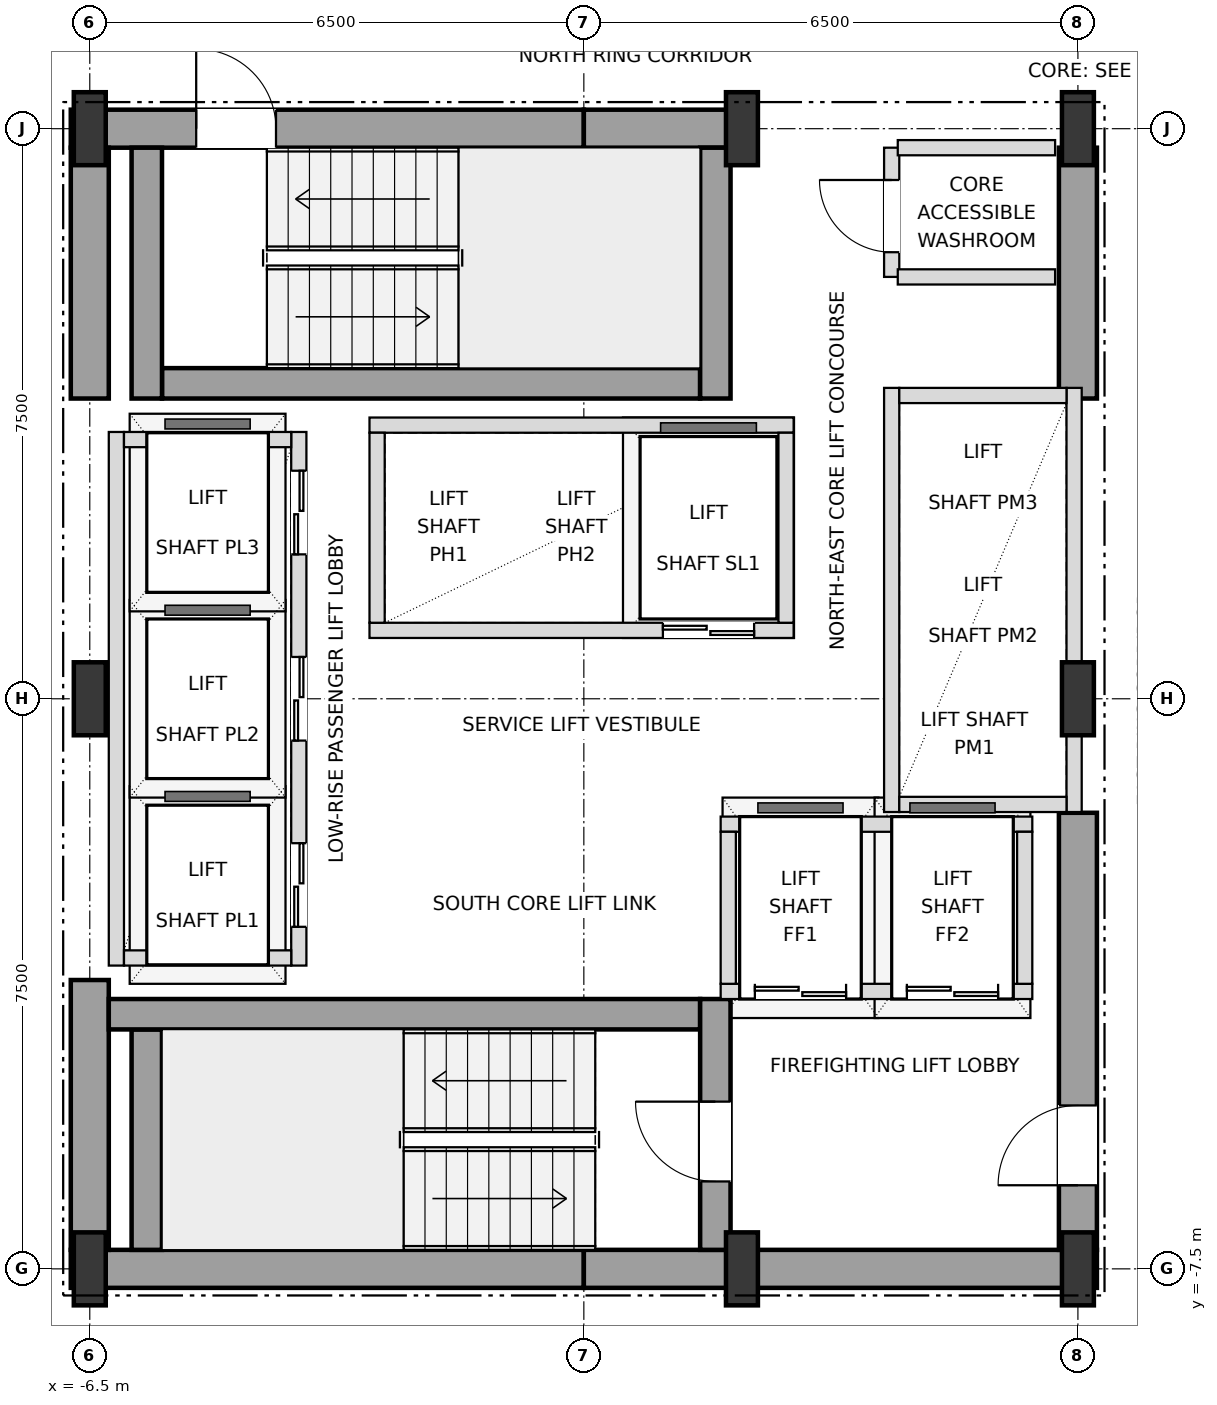
"""IFC4 building model, lengths in metres.
Left out: names, types, materials, properties, quantities, classifications, styles, units other than length and angle.
Written with IfcOpenShell. Run it as: python <this file> out.ifc"""

import sys

from ifc_helpers import new_model, si_unit, direction, frame, frame_2d, origin, origin_2d, place, context, subcontext, project, spatial, rectangle, i_section, extrude, element, fill, save


model = new_model("IFC4")
c1 = context("Model", 3, precision=1e-05, world=origin(), true_north=direction((0.0, 1.0)))
c2 = subcontext(c1, "Body", "Model", "MODEL_VIEW")
j1 = project(units=[si_unit("LENGTHUNIT", "METRE"), si_unit("PLANEANGLEUNIT", "RADIAN")], contexts=[c1])
p1 = place(None, origin())
s1 = spatial("IfcSite", under=j1, at=p1, CompositionType="ELEMENT")
p2 = place(p1, origin())
s2 = spatial("IfcBuilding", under=s1, at=p2, CompositionType="ELEMENT")
p3 = place(p2, frame((0.0, 0.0, 102.6)))
s3 = spatial("IfcBuildingStorey", under=s2, at=p3, CompositionType="ELEMENT", Elevation=102.6)
for number, where, z_axis, x_axis in (
    (1, (-6.5, -7.5, 0.0), (0.0, 0.0, 1.0), (1.0, 0.0, 0.0)),
    (2, (2.08, -7.5, 0.0), (0.0, 0.0, 1.0), (1.0, 0.0, 0.0)),
    (3, (6.5, -7.5, 0.0), (0.0, 0.0, 1.0), (1.0, 0.0, 0.0)),
    (4, (-6.5, 0.0, 0.0), (0.0, 0.0, 1.0), (1.0, 0.0, 0.0)),
    (5, (6.5, 0.0, 0.0), (0.0, 0.0, 1.0), (1.0, 0.0, 0.0)),
    (6, (-6.5, 7.5, 0.0), (0.0, 0.0, 1.0), (1.0, 0.0, 0.0)),
    (7, (2.08, 7.5, 0.0), (0.0, 0.0, 1.0), (1.0, 0.0, 0.0)),
    (8, (6.5, 7.5, 0.0), (0.0, 0.0, 1.0), (1.0, 0.0, 0.0)),
):
    element("IfcColumn", number, at=place(p3, frame(where, z_axis=z_axis, x_axis=x_axis)), inside=s3, PredefinedType="COLUMN", context=c2, shape_type="SweptSolid", body=[
        extrude(i_section(OverallWidth=0.42, OverallDepth=0.96, WebThickness=0.022, FlangeThickness=0.034, at=origin_2d()), origin(), (0.0, 0.0, 1.0), 3.6),
    ])
for number, where, z_axis, x_axis in (
    (9, (-6.75, -7.5, 0.0), (0.0, 0.0, 1.0), (1.0, 0.0, 0.0)),
    (10, (0.0, -7.5, 0.0), (0.0, 0.0, 1.0), (1.0, 0.0, 0.0)),
):
    element("IfcWall", number, at=place(p3, frame(where, z_axis=z_axis, x_axis=x_axis)), inside=s3, PredefinedType="SHEAR", context=c2, shape_type="SweptSolid", body=[
        extrude(rectangle(XDim=6.75, YDim=0.5, at=frame_2d((3.375, 0.0))), origin(), (0.0, 0.0, 1.0), 3.38),
    ])
p4 = place(p3, frame((-6.75, 7.5, 0.0), z_axis=(0.0, 0.0, 1.0), x_axis=(1.0, 0.0, 0.0)))
e11 = element("IfcWall", 11, at=p4, inside=s3, PredefinedType="SHEAR", context=c2, shape_type="SweptSolid", body=[
    extrude(rectangle(XDim=6.75, YDim=0.5, at=frame_2d((3.375, 0.0))), origin(), (0.0, 0.0, 1.0), 3.38),
])
p5 = place(p4, frame((1.65, 0.0, 0.0)))
e12 = element("IfcOpeningElement", 12, at=p5, cuts=e11, PredefinedType="OPENING", context=c2, shape_type="SweptSolid", body=[
    extrude(rectangle(XDim=1.05, YDim=2.15, at=frame_2d((0.525, 1.075))), frame((0.0, 0.26, 0.0), z_axis=(0.0, -1.0, 0.0), x_axis=(1.0, 0.0, 0.0)), (0.0, 0.0, 1.0), 0.52),
])
p6 = place(p3, frame((0.0, 7.5, 0.0), z_axis=(0.0, 0.0, 1.0), x_axis=(1.0, 0.0, 0.0)))
e13 = element("IfcWall", 13, at=p6, inside=s3, PredefinedType="SHEAR", context=c2, shape_type="SweptSolid", body=[
    extrude(rectangle(XDim=2.08, YDim=0.5, at=frame_2d((1.04, 0.0))), origin(), (0.0, 0.0, 1.0), 3.38),
])
p7 = place(p3, frame((-6.5, -7.25, 0.0), z_axis=(0.0, 0.0, 1.0), x_axis=(0.0, 1.0, 0.0)))
e14 = element("IfcWall", 14, at=p7, inside=s3, PredefinedType="SHEAR", context=c2, shape_type="SweptSolid", body=[
    extrude(rectangle(XDim=3.55, YDim=0.5, at=frame_2d((1.775, 0.0))), origin(), (0.0, 0.0, 1.0), 3.38),
])
p8 = place(p3, frame((-6.5, 3.95, 0.0), z_axis=(0.0, 0.0, 1.0), x_axis=(0.0, 1.0, 0.0)))
e15 = element("IfcWall", 15, at=p8, inside=s3, PredefinedType="SHEAR", context=c2, shape_type="SweptSolid", body=[
    extrude(rectangle(XDim=3.3, YDim=0.5, at=frame_2d((1.65, 0.0))), origin(), (0.0, 0.0, 1.0), 3.38),
])
p9 = place(p3, frame((6.5, -7.25, 0.0), z_axis=(0.0, 0.0, 1.0), x_axis=(0.0, 1.0, 0.0)))
e16 = element("IfcWall", 16, at=p9, inside=s3, PredefinedType="SHEAR", context=c2, shape_type="SweptSolid", body=[
    extrude(rectangle(XDim=5.75, YDim=0.5, at=frame_2d((2.875, 0.0))), origin(), (0.0, 0.0, 1.0), 3.38),
])
p10 = place(p9, frame((0.85, 0.0, 0.0)))
e17 = element("IfcOpeningElement", 17, at=p10, cuts=e16, PredefinedType="OPENING", context=c2, shape_type="SweptSolid", body=[
    extrude(rectangle(XDim=1.05, YDim=2.15, at=frame_2d((0.525, 1.075))), frame((0.0, 0.26, 0.0), z_axis=(0.0, -1.0, 0.0), x_axis=(1.0, 0.0, 0.0)), (0.0, 0.0, 1.0), 0.52),
])
p11 = place(p3, frame((6.5, 3.95, 0.0), z_axis=(0.0, 0.0, 1.0), x_axis=(0.0, 1.0, 0.0)))
e18 = element("IfcWall", 18, at=p11, inside=s3, PredefinedType="SHEAR", context=c2, shape_type="SweptSolid", body=[
    extrude(rectangle(XDim=3.3, YDim=0.5, at=frame_2d((1.65, 0.0))), origin(), (0.0, 0.0, 1.0), 3.38),
])
p12 = place(p3, frame((-5.75, -7.25, 0.0), z_axis=(0.0, 0.0, 1.0), x_axis=(0.0, 1.0, 0.0)))
e19 = element("IfcWall", 19, at=p12, inside=s3, PredefinedType="SHEAR", context=c2, shape_type="SweptSolid", body=[
    extrude(rectangle(XDim=2.9, YDim=0.4, at=frame_2d((1.45, 0.0))), origin(), (0.0, 0.0, 1.0), 3.38),
])
p13 = place(p3, frame((-6.25, -4.15, 0.0), z_axis=(0.0, 0.0, 1.0), x_axis=(1.0, 0.0, 0.0)))
e20 = element("IfcWall", 20, at=p13, inside=s3, PredefinedType="SHEAR", context=c2, shape_type="SweptSolid", body=[
    extrude(rectangle(XDim=7.78, YDim=0.4, at=frame_2d((3.89, 0.0))), origin(), (0.0, 0.0, 1.0), 3.38),
])
p14 = place(p3, frame((1.73, -7.25, 0.0), z_axis=(0.0, 0.0, 1.0), x_axis=(0.0, 1.0, 0.0)))
e21 = element("IfcWall", 21, at=p14, inside=s3, PredefinedType="SHEAR", context=c2, shape_type="SweptSolid", body=[
    extrude(rectangle(XDim=3.3, YDim=0.4, at=frame_2d((1.65, 0.0))), origin(), (0.0, 0.0, 1.0), 3.38),
])
p15 = place(p14, frame((0.9, 0.0, 0.0)))
e22 = element("IfcOpeningElement", 22, at=p15, cuts=e21, PredefinedType="OPENING", context=c2, shape_type="SweptSolid", body=[
    extrude(rectangle(XDim=1.05, YDim=2.15, at=frame_2d((0.525, 1.075))), frame((0.0, 0.21, 0.0), z_axis=(0.0, -1.0, 0.0), x_axis=(1.0, 0.0, 0.0)), (0.0, 0.0, 1.0), 0.42),
])
p16 = place(p3, frame((-5.55, 4.15, 0.0), z_axis=(0.0, 0.0, 1.0), x_axis=(1.0, 0.0, 0.0)))
e23 = element("IfcWall", 23, at=p16, inside=s3, PredefinedType="SHEAR", context=c2, shape_type="SweptSolid", body=[
    extrude(rectangle(XDim=7.08, YDim=0.4, at=frame_2d((3.54, 0.0))), origin(), (0.0, 0.0, 1.0), 3.38),
])
for number, where, z_axis, x_axis in (
    (24, (1.73, 3.95, 0.0), (0.0, 0.0, 1.0), (0.0, 1.0, 0.0)),
    (25, (-5.75, 3.95, 0.0), (0.0, 0.0, 1.0), (0.0, 1.0, 0.0)),
):
    element("IfcWall", number, at=place(p3, frame(where, z_axis=z_axis, x_axis=x_axis)), inside=s3, PredefinedType="SHEAR", context=c2, shape_type="SweptSolid", body=[
        extrude(rectangle(XDim=3.3, YDim=0.4, at=frame_2d((1.65, 0.0))), origin(), (0.0, 0.0, 1.0), 3.38),
    ])
p17 = place(p3, frame((-3.75, -3.51, 0.0), z_axis=(0.0, 0.0, 1.0), x_axis=(0.0, 1.0, 0.0)))
e26 = element("IfcWall", 26, at=p17, inside=s3, PredefinedType="SOLIDWALL", context=c2, shape_type="SweptSolid", body=[
    extrude(rectangle(XDim=7.02, YDim=0.2, at=frame_2d((3.51, 0.0))), origin(), (0.0, 0.0, 1.0), 3.38),
])
p18 = place(p17, frame((0.51, 0.0, 0.0)))
e27 = element("IfcOpeningElement", 27, at=p18, cuts=e26, PredefinedType="OPENING", context=c2, shape_type="SweptSolid", body=[
    extrude(rectangle(XDim=1.1, YDim=2.15, at=frame_2d((0.55, 1.075))), frame((0.0, 0.11, 0.0), z_axis=(0.0, -1.0, 0.0), x_axis=(1.0, 0.0, 0.0)), (0.0, 0.0, 1.0), 0.22),
])
p19 = place(p17, frame((2.96, 0.0, 0.0)))
e28 = element("IfcOpeningElement", 28, at=p19, cuts=e26, PredefinedType="OPENING", context=c2, shape_type="SweptSolid", body=[
    extrude(rectangle(XDim=1.1, YDim=2.15, at=frame_2d((0.55, 1.075))), frame((0.0, 0.11, 0.0), z_axis=(0.0, -1.0, 0.0), x_axis=(1.0, 0.0, 0.0)), (0.0, 0.0, 1.0), 0.22),
])
p20 = place(p17, frame((5.41, 0.0, 0.0)))
e29 = element("IfcOpeningElement", 29, at=p20, cuts=e26, PredefinedType="OPENING", context=c2, shape_type="SweptSolid", body=[
    extrude(rectangle(XDim=1.1, YDim=2.15, at=frame_2d((0.55, 1.075))), frame((0.0, 0.11, 0.0), z_axis=(0.0, -1.0, 0.0), x_axis=(1.0, 0.0, 0.0)), (0.0, 0.0, 1.0), 0.22),
])
p21 = place(p3, frame((-6.15, -3.51, 0.0), z_axis=(0.0, 0.0, 1.0), x_axis=(0.0, 1.0, 0.0)))
e30 = element("IfcWall", 30, at=p21, inside=s3, PredefinedType="SOLIDWALL", context=c2, shape_type="SweptSolid", body=[
    extrude(rectangle(XDim=7.02, YDim=0.2, at=frame_2d((3.51, 0.0))), origin(), (0.0, 0.0, 1.0), 3.38),
])
for number, where, z_axis, x_axis in (
    (31, (-6.05, -3.41, 0.0), (0.0, 0.0, 1.0), (1.0, 0.0, 0.0)),
    (32, (-6.05, 3.41, 0.0), (0.0, 0.0, 1.0), (1.0, 0.0, 0.0)),
):
    element("IfcWall", number, at=place(p3, frame(where, z_axis=z_axis, x_axis=x_axis)), inside=s3, PredefinedType="SOLIDWALL", context=c2, shape_type="SweptSolid", body=[
        extrude(rectangle(XDim=2.2, YDim=0.2, at=frame_2d((1.1, 0.0))), origin(), (0.0, 0.0, 1.0), 3.38),
    ])
p22 = place(p3, frame((4.05, -1.49, 0.0), z_axis=(0.0, 0.0, 1.0), x_axis=(0.0, 1.0, 0.0)))
e33 = element("IfcWall", 33, at=p22, inside=s3, PredefinedType="SOLIDWALL", context=c2, shape_type="SweptSolid", body=[
    extrude(rectangle(XDim=5.58, YDim=0.2, at=frame_2d((2.79, 0.0))), origin(), (0.0, 0.0, 1.0), 3.38),
])
p23 = place(p3, frame((6.45, -1.49, 0.0), z_axis=(0.0, 0.0, 1.0), x_axis=(0.0, 1.0, 0.0)))
e34 = element("IfcWall", 34, at=p23, inside=s3, PredefinedType="SOLIDWALL", context=c2, shape_type="SweptSolid", body=[
    extrude(rectangle(XDim=5.58, YDim=0.2, at=frame_2d((2.79, 0.0))), origin(), (0.0, 0.0, 1.0), 2.816),
])
for number, where, z_axis, x_axis in (
    (35, (4.15, -1.39, 0.0), (0.0, 0.0, 1.0), (1.0, 0.0, 0.0)),
    (36, (4.15, 3.99, 0.0), (0.0, 0.0, 1.0), (1.0, 0.0, 0.0)),
):
    element("IfcWall", number, at=place(p3, frame(where, z_axis=z_axis, x_axis=x_axis)), inside=s3, PredefinedType="SOLIDWALL", context=c2, shape_type="SweptSolid", body=[
        extrude(rectangle(XDim=2.2, YDim=0.2, at=frame_2d((1.1, 0.0))), origin(), (0.0, 0.0, 1.0), 3.38),
    ])
p24 = place(p3, frame((-2.82, 0.9, 0.0), z_axis=(0.0, 0.0, 1.0), x_axis=(1.0, 0.0, 0.0)))
e37 = element("IfcWall", 37, at=p24, inside=s3, PredefinedType="SOLIDWALL", context=c2, shape_type="SweptSolid", body=[
    extrude(rectangle(XDim=5.58, YDim=0.2, at=frame_2d((2.79, 0.0))), origin(), (0.0, 0.0, 1.0), 3.38),
])
p25 = place(p24, frame((3.86, 0.0, 0.0)))
e38 = element("IfcOpeningElement", 38, at=p25, cuts=e37, PredefinedType="OPENING", context=c2, shape_type="SweptSolid", body=[
    extrude(rectangle(XDim=1.2, YDim=2.2, at=frame_2d((0.6, 1.1))), frame((0.0, 0.11, 0.0), z_axis=(0.0, -1.0, 0.0), x_axis=(1.0, 0.0, 0.0)), (0.0, 0.0, 1.0), 0.22),
])
p26 = place(p3, frame((-2.82, 3.6, 0.0), z_axis=(0.0, 0.0, 1.0), x_axis=(1.0, 0.0, 0.0)))
e39 = element("IfcWall", 39, at=p26, inside=s3, PredefinedType="SOLIDWALL", context=c2, shape_type="SweptSolid", body=[
    extrude(rectangle(XDim=5.58, YDim=0.2, at=frame_2d((2.79, 0.0))), origin(), (0.0, 0.0, 1.0), 3.38),
])
for number, where, z_axis, x_axis in (
    (40, (-2.72, 1.0, 0.0), (0.0, 0.0, 1.0), (0.0, 1.0, 0.0)),
    (41, (2.66, 1.0, 0.0), (0.0, 0.0, 1.0), (0.0, 1.0, 0.0)),
):
    element("IfcWall", number, at=place(p3, frame(where, z_axis=z_axis, x_axis=x_axis)), inside=s3, PredefinedType="SOLIDWALL", context=c2, shape_type="SweptSolid", body=[
        extrude(rectangle(XDim=2.5, YDim=0.2, at=frame_2d((1.25, 0.0))), origin(), (0.0, 0.0, 1.0), 3.38),
    ])
p27 = place(p3, frame((1.8, -3.85, 0.0), z_axis=(0.0, 0.0, 1.0), x_axis=(1.0, 0.0, 0.0)))
e42 = element("IfcWall", 42, at=p27, inside=s3, PredefinedType="SOLIDWALL", context=c2, shape_type="SweptSolid", body=[
    extrude(rectangle(XDim=4.1, YDim=0.2, at=frame_2d((2.05, 0.0))), origin(), (0.0, 0.0, 1.0), 3.38),
])
p28 = place(p27, frame((0.45, 0.0, 0.0)))
e43 = element("IfcOpeningElement", 43, at=p28, cuts=e42, PredefinedType="OPENING", context=c2, shape_type="SweptSolid", body=[
    extrude(rectangle(XDim=1.2, YDim=2.2, at=frame_2d((0.6, 1.1))), frame((0.0, 0.11, 0.0), z_axis=(0.0, -1.0, 0.0), x_axis=(1.0, 0.0, 0.0)), (0.0, 0.0, 1.0), 0.22),
])
p29 = place(p27, frame((2.45, 0.0, 0.0)))
e44 = element("IfcOpeningElement", 44, at=p29, cuts=e42, PredefinedType="OPENING", context=c2, shape_type="SweptSolid", body=[
    extrude(rectangle(XDim=1.2, YDim=2.2, at=frame_2d((0.6, 1.1))), frame((0.0, 0.11, 0.0), z_axis=(0.0, -1.0, 0.0), x_axis=(1.0, 0.0, 0.0)), (0.0, 0.0, 1.0), 0.22),
])
p30 = place(p3, frame((1.8, -1.65, 0.0), z_axis=(0.0, 0.0, 1.0), x_axis=(1.0, 0.0, 0.0)))
e45 = element("IfcWall", 45, at=p30, inside=s3, PredefinedType="SOLIDWALL", context=c2, shape_type="SweptSolid", body=[
    extrude(rectangle(XDim=4.1, YDim=0.2, at=frame_2d((2.05, 0.0))), origin(), (0.0, 0.0, 1.0), 3.38),
])
for number, where, z_axis, x_axis in (
    (46, (1.9, -3.75, 0.0), (0.0, 0.0, 1.0), (0.0, 1.0, 0.0)),
    (47, (5.8, -3.75, 0.0), (0.0, 0.0, 1.0), (0.0, 1.0, 0.0)),
):
    element("IfcWall", number, at=place(p3, frame(where, z_axis=z_axis, x_axis=x_axis)), inside=s3, PredefinedType="SOLIDWALL", context=c2, shape_type="SweptSolid", body=[
        extrude(rectangle(XDim=2.0, YDim=0.2, at=frame_2d((1.0, 0.0))), origin(), (0.0, 0.0, 1.0), 3.38),
    ])
p31 = place(p3, frame((4.05, 5.55, 0.0), z_axis=(0.0, 0.0, 1.0), x_axis=(0.0, 1.0, 0.0)))
e48 = element("IfcWall", 48, at=p31, inside=s3, PredefinedType="SOLIDWALL", context=c2, shape_type="SweptSolid", body=[
    extrude(rectangle(XDim=1.7, YDim=0.2, at=frame_2d((0.85, 0.0))), origin(), (0.0, 0.0, 1.0), 3.38),
])
p32 = place(p31, frame((0.325, 0.0, 0.0)))
e49 = element("IfcOpeningElement", 49, at=p32, cuts=e48, PredefinedType="OPENING", context=c2, shape_type="SweptSolid", body=[
    extrude(rectangle(XDim=0.95, YDim=2.15, at=frame_2d((0.475, 1.075))), frame((0.0, 0.11, 0.0), z_axis=(0.0, -1.0, 0.0), x_axis=(1.0, 0.0, 0.0)), (0.0, 0.0, 1.0), 0.22),
])
for number, where, z_axis, x_axis in (
    (50, (4.13, 5.55, 0.0), (0.0, 0.0, 1.0), (1.0, 0.0, 0.0)),
    (51, (4.13, 7.25, 0.0), (0.0, 0.0, 1.0), (1.0, 0.0, 0.0)),
):
    element("IfcWall", number, at=place(p3, frame(where, z_axis=z_axis, x_axis=x_axis)), inside=s3, PredefinedType="SOLIDWALL", context=c2, shape_type="SweptSolid", body=[
        extrude(rectangle(XDim=2.07, YDim=0.2, at=frame_2d((1.035, 0.0))), origin(), (0.0, 0.0, 1.0), 3.38),
    ])
p33 = place(p10, origin())
e52 = element("IfcDoor", 52, at=p33, inside=s3, OperationType="SINGLE_SWING_LEFT", PredefinedType="DOOR", context=c2, shape_type="SweptSolid", body=[
    extrude(rectangle(XDim=1.05, YDim=2.15, at=frame_2d((0.525, 1.075))), frame((0.0, 0.025, 0.0), z_axis=(0.0, -1.0, 0.0), x_axis=(1.0, 0.0, 0.0)), (0.0, 0.0, 1.0), 0.05),
])
fill(e17, e52)
p34 = place(p15, origin())
e53 = element("IfcDoor", 53, at=p34, inside=s3, OperationType="SINGLE_SWING_RIGHT", PredefinedType="DOOR", context=c2, shape_type="SweptSolid", body=[
    extrude(rectangle(XDim=1.05, YDim=2.15, at=frame_2d((0.525, 1.075))), frame((0.0, 0.025, 0.0), z_axis=(0.0, -1.0, 0.0), x_axis=(1.0, 0.0, 0.0)), (0.0, 0.0, 1.0), 0.05),
])
fill(e22, e53)
p35 = place(p5, origin())
e54 = element("IfcDoor", 54, at=p35, inside=s3, OperationType="SINGLE_SWING_LEFT", PredefinedType="DOOR", context=c2, shape_type="SweptSolid", body=[
    extrude(rectangle(XDim=1.05, YDim=2.15, at=frame_2d((0.525, 1.075))), frame((0.0, 0.025, 0.0), z_axis=(0.0, -1.0, 0.0), x_axis=(1.0, 0.0, 0.0)), (0.0, 0.0, 1.0), 0.05),
])
fill(e12, e54)
p36 = place(p18, origin())
e55 = element("IfcDoor", 55, at=p36, inside=s3, OperationType="DOUBLE_DOOR_SLIDING", PredefinedType="DOOR", context=c2, shape_type="SweptSolid", body=[
    extrude(rectangle(XDim=1.1, YDim=2.15, at=frame_2d((0.55, 1.075))), frame((0.0, 0.025, 0.0), z_axis=(0.0, -1.0, 0.0), x_axis=(1.0, 0.0, 0.0)), (0.0, 0.0, 1.0), 0.05),
])
fill(e27, e55)
p37 = place(p19, origin())
e56 = element("IfcDoor", 56, at=p37, inside=s3, OperationType="DOUBLE_DOOR_SLIDING", PredefinedType="DOOR", context=c2, shape_type="SweptSolid", body=[
    extrude(rectangle(XDim=1.1, YDim=2.15, at=frame_2d((0.55, 1.075))), frame((0.0, 0.025, 0.0), z_axis=(0.0, -1.0, 0.0), x_axis=(1.0, 0.0, 0.0)), (0.0, 0.0, 1.0), 0.05),
])
fill(e28, e56)
p38 = place(p20, origin())
e57 = element("IfcDoor", 57, at=p38, inside=s3, OperationType="DOUBLE_DOOR_SLIDING", PredefinedType="DOOR", context=c2, shape_type="SweptSolid", body=[
    extrude(rectangle(XDim=1.1, YDim=2.15, at=frame_2d((0.55, 1.075))), frame((0.0, 0.025, 0.0), z_axis=(0.0, -1.0, 0.0), x_axis=(1.0, 0.0, 0.0)), (0.0, 0.0, 1.0), 0.05),
])
fill(e29, e57)
p39 = place(p25, origin())
e58 = element("IfcDoor", 58, at=p39, inside=s3, OperationType="DOUBLE_DOOR_SLIDING", PredefinedType="DOOR", context=c2, shape_type="SweptSolid", body=[
    extrude(rectangle(XDim=1.2, YDim=2.2, at=frame_2d((0.6, 1.1))), frame((0.0, 0.025, 0.0), z_axis=(0.0, -1.0, 0.0), x_axis=(1.0, 0.0, 0.0)), (0.0, 0.0, 1.0), 0.05),
])
fill(e38, e58)
p40 = place(p28, origin())
e59 = element("IfcDoor", 59, at=p40, inside=s3, OperationType="DOUBLE_DOOR_SLIDING", PredefinedType="DOOR", context=c2, shape_type="SweptSolid", body=[
    extrude(rectangle(XDim=1.2, YDim=2.2, at=frame_2d((0.6, 1.1))), frame((0.0, 0.025, 0.0), z_axis=(0.0, -1.0, 0.0), x_axis=(1.0, 0.0, 0.0)), (0.0, 0.0, 1.0), 0.05),
])
fill(e43, e59)
p41 = place(p29, origin())
e60 = element("IfcDoor", 60, at=p41, inside=s3, OperationType="DOUBLE_DOOR_SLIDING", PredefinedType="DOOR", context=c2, shape_type="SweptSolid", body=[
    extrude(rectangle(XDim=1.2, YDim=2.2, at=frame_2d((0.6, 1.1))), frame((0.0, 0.025, 0.0), z_axis=(0.0, -1.0, 0.0), x_axis=(1.0, 0.0, 0.0)), (0.0, 0.0, 1.0), 0.05),
])
fill(e44, e60)
p42 = place(p32, origin())
e61 = element("IfcDoor", 61, at=p42, inside=s3, OperationType="SINGLE_SWING_RIGHT", PredefinedType="DOOR", context=c2, shape_type="SweptSolid", body=[
    extrude(rectangle(XDim=0.95, YDim=2.15, at=frame_2d((0.475, 1.075))), frame((0.0, 0.025, 0.0), z_axis=(0.0, -1.0, 0.0), x_axis=(1.0, 0.0, 0.0)), (0.0, 0.0, 1.0), 0.05),
])
fill(e49, e61)
save(model, sys.argv[1])
